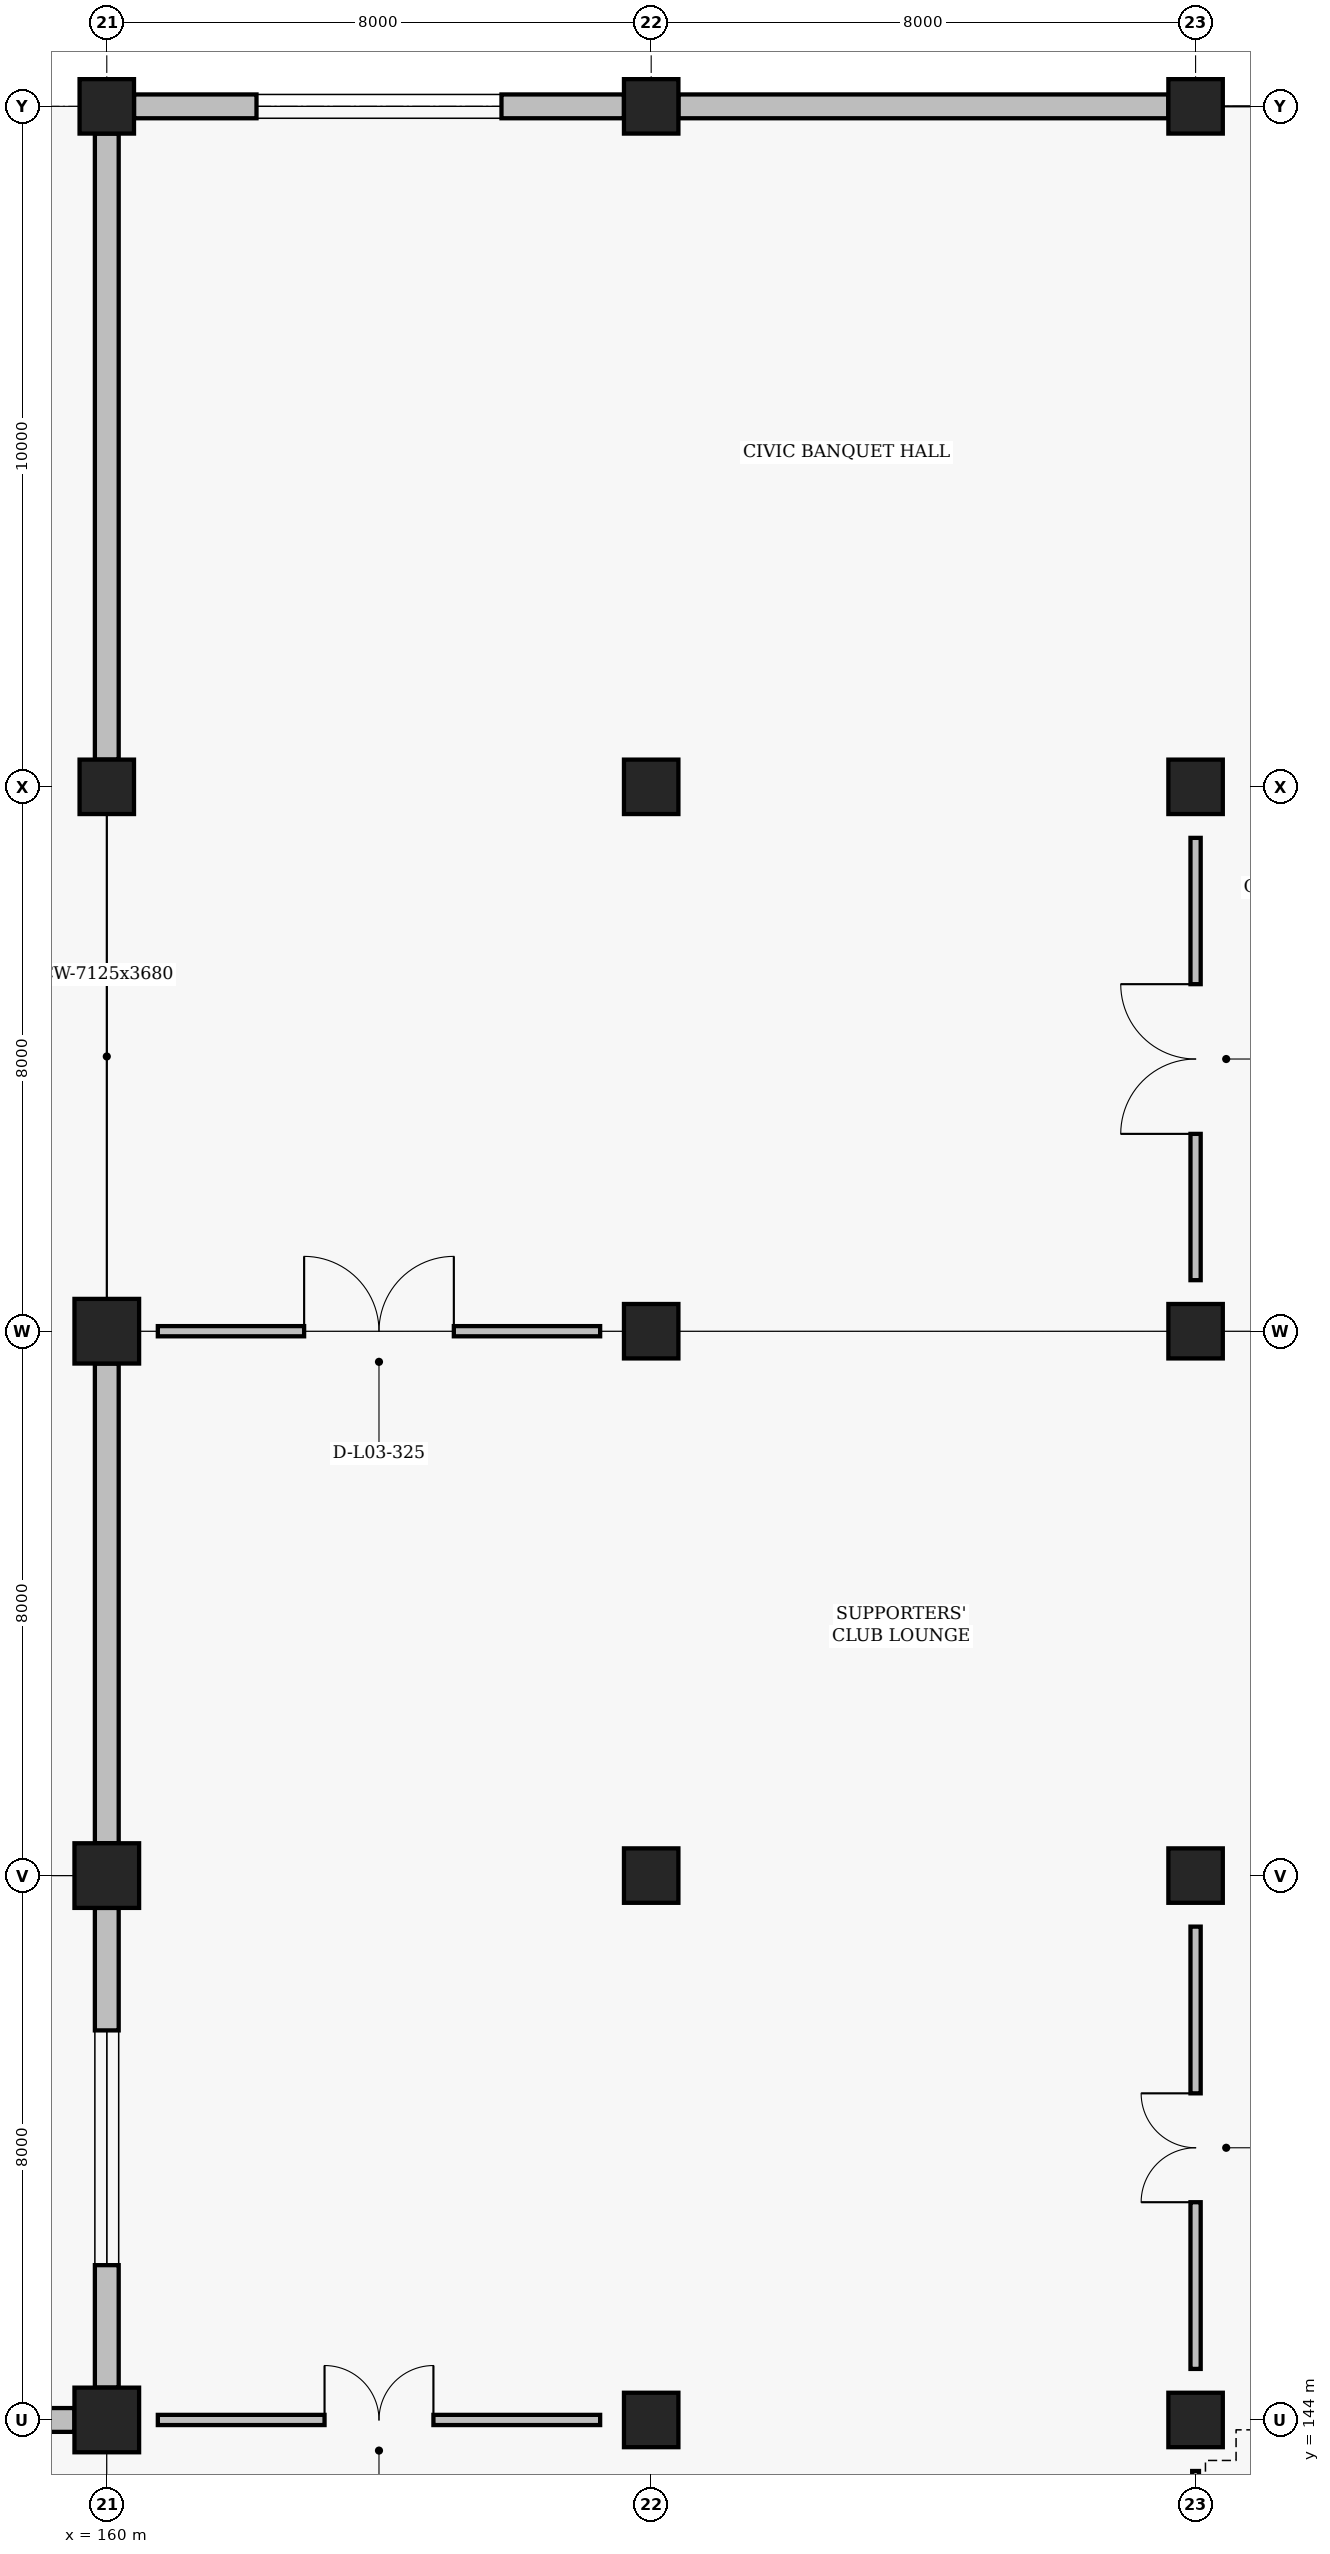
"""IFC4 building model, lengths in metres.
Left out: names, types, materials, properties, quantities, classifications, styles, units other than length and angle.
Written with IfcOpenShell. Run it as: python <this file> out.ifc"""

import sys

from ifc_helpers import new_model, si_unit, direction, frame, frame_2d, origin, origin_2d, place, context, subcontext, project, spatial, rectangle, extrude, element, fill, save


model = new_model("IFC4")
c1 = context("Model", 3, precision=1e-05, world=origin(), true_north=direction((0.0, 1.0)))
c2 = subcontext(c1, "Body", "Model", "MODEL_VIEW")
j1 = project(units=[si_unit("LENGTHUNIT", "METRE"), si_unit("PLANEANGLEUNIT", "RADIAN")], contexts=[c1])
p1 = place(None, origin())
s1 = spatial("IfcSite", under=j1, at=p1, CompositionType="ELEMENT")
p2 = place(p1, origin())
s2 = spatial("IfcBuilding", under=s1, at=p2, CompositionType="ELEMENT")
p3 = place(p2, frame((0.0, 0.0, 9.6)))
s3 = spatial("IfcBuildingStorey", under=s2, at=p3, CompositionType="ELEMENT", Elevation=9.6)
for number, where, z_axis, x_axis in (
    (1, (160.0, 144.0, 0.0), (0.0, 0.0, 1.0), (1.0, 0.0, 0.0)),
    (2, (160.0, 152.0, 0.0), (0.0, 0.0, 1.0), (1.0, 0.0, 0.0)),
    (3, (160.0, 160.0, 0.0), (0.0, 0.0, 1.0), (1.0, 0.0, 0.0)),
):
    element("IfcColumn", number, at=place(p3, frame(where, z_axis=z_axis, x_axis=x_axis)), inside=s3, PredefinedType="COLUMN", context=c2, shape_type="SweptSolid", body=[
        extrude(rectangle(XDim=0.95, YDim=0.95, at=origin_2d()), origin(), (0.0, 0.0, 1.0), 4.8),
    ])
for number, where, z_axis, x_axis in (
    (4, (160.0, 168.0, 0.0), (0.0, 0.0, 1.0), (1.0, 0.0, 0.0)),
    (5, (160.0, 178.0, 0.0), (0.0, 0.0, 1.0), (1.0, 0.0, 0.0)),
    (6, (168.0, 144.0, 0.0), (0.0, 0.0, 1.0), (1.0, 0.0, 0.0)),
    (7, (168.0, 152.0, 0.0), (0.0, 0.0, 1.0), (1.0, 0.0, 0.0)),
    (8, (168.0, 160.0, 0.0), (0.0, 0.0, 1.0), (1.0, 0.0, 0.0)),
    (9, (168.0, 168.0, 0.0), (0.0, 0.0, 1.0), (1.0, 0.0, 0.0)),
    (10, (168.0, 178.0, 0.0), (0.0, 0.0, 1.0), (1.0, 0.0, 0.0)),
    (11, (176.0, 144.0, 0.0), (0.0, 0.0, 1.0), (1.0, 0.0, 0.0)),
    (12, (176.0, 152.0, 0.0), (0.0, 0.0, 1.0), (1.0, 0.0, 0.0)),
    (13, (176.0, 160.0, 0.0), (0.0, 0.0, 1.0), (1.0, 0.0, 0.0)),
    (14, (176.0, 168.0, 0.0), (0.0, 0.0, 1.0), (1.0, 0.0, 0.0)),
    (15, (176.0, 178.0, 0.0), (0.0, 0.0, 1.0), (1.0, 0.0, 0.0)),
):
    element("IfcColumn", number, at=place(p3, frame(where, z_axis=z_axis, x_axis=x_axis)), inside=s3, PredefinedType="COLUMN", context=c2, shape_type="SweptSolid", body=[
        extrude(rectangle(XDim=0.8, YDim=0.8, at=origin_2d()), origin(), (0.0, 0.0, 1.0), 4.8),
    ])
p4 = place(p3, frame((152.475, 144.0, 0.0), z_axis=(0.0, 0.0, 1.0), x_axis=(1.0, 0.0, 0.0)))
e16 = element("IfcWall", 16, at=p4, inside=s3, PredefinedType="SOLIDWALL", context=c2, shape_type="SweptSolid", body=[
    extrude(rectangle(XDim=7.05, YDim=0.35, at=frame_2d((3.525, 0.0))), origin(), (0.0, 0.0, 1.0), 3.93),
])
p5 = place(p3, frame((160.0, 144.475, 0.0), z_axis=(0.0, 0.0, 1.0), x_axis=(0.0, 1.0, 0.0)))
e17 = element("IfcWall", 17, at=p5, inside=s3, PredefinedType="SOLIDWALL", context=c2, shape_type="SweptSolid", body=[
    extrude(rectangle(XDim=7.05, YDim=0.35, at=frame_2d((3.525, 0.0))), origin(), (0.0, 0.0, 1.0), 3.93),
])
p6 = place(p5, frame((1.8, 0.0, 0.95)))
e18 = element("IfcOpeningElement", 18, at=p6, cuts=e17, PredefinedType="OPENING", context=c2, shape_type="SweptSolid", body=[
    extrude(rectangle(XDim=3.45, YDim=2.2, at=frame_2d((1.725, 1.1))), frame((0.0, 0.185, 0.0), z_axis=(0.0, -1.0, 0.0), x_axis=(1.0, 0.0, 0.0)), (0.0, 0.0, 1.0), 0.37),
])
p7 = place(p3, frame((160.0, 152.475, 0.0), z_axis=(0.0, 0.0, 1.0), x_axis=(0.0, 1.0, 0.0)))
e19 = element("IfcWall", 19, at=p7, inside=s3, PredefinedType="SOLIDWALL", context=c2, shape_type="SweptSolid", body=[
    extrude(rectangle(XDim=7.05, YDim=0.35, at=frame_2d((3.525, 0.0))), origin(), (0.0, 0.0, 1.0), 3.68),
])
p8 = place(p3, frame((160.4, 178.0, 0.0), z_axis=(0.0, 0.0, 1.0), x_axis=(1.0, 0.0, 0.0)))
e20 = element("IfcWall", 20, at=p8, inside=s3, PredefinedType="SOLIDWALL", context=c2, shape_type="SweptSolid", body=[
    extrude(rectangle(XDim=7.2, YDim=0.35, at=frame_2d((3.6, 0.0))), origin(), (0.0, 0.0, 1.0), 3.73),
])
p9 = place(p8, frame((1.8, 0.0, 0.95)))
e21 = element("IfcOpeningElement", 21, at=p9, cuts=e20, PredefinedType="OPENING", context=c2, shape_type="SweptSolid", body=[
    extrude(rectangle(XDim=3.6, YDim=2.2, at=frame_2d((1.8, 1.1))), frame((0.0, 0.185, 0.0), z_axis=(0.0, -1.0, 0.0), x_axis=(1.0, 0.0, 0.0)), (0.0, 0.0, 1.0), 0.37),
])
p10 = place(p3, frame((160.0, 168.4, 0.0), z_axis=(0.0, 0.0, 1.0), x_axis=(0.0, 1.0, 0.0)))
e22 = element("IfcWall", 22, at=p10, inside=s3, PredefinedType="SOLIDWALL", context=c2, shape_type="SweptSolid", body=[
    extrude(rectangle(XDim=9.2, YDim=0.35, at=frame_2d((4.6, 0.0))), origin(), (0.0, 0.0, 1.0), 3.93),
])
p11 = place(p3, frame((168.4, 178.0, 0.0), z_axis=(0.0, 0.0, 1.0), x_axis=(1.0, 0.0, 0.0)))
e23 = element("IfcWall", 23, at=p11, inside=s3, PredefinedType="SOLIDWALL", context=c2, shape_type="SweptSolid", body=[
    extrude(rectangle(XDim=7.2, YDim=0.35, at=frame_2d((3.6, 0.0))), origin(), (0.0, 0.0, 1.0), 3.73),
])
p12 = place(p3, frame((160.75, 144.0, 0.0), z_axis=(0.0, 0.0, 1.0), x_axis=(1.0, 0.0, 0.0)))
e24 = element("IfcWall", 24, at=p12, inside=s3, PredefinedType="PARTITIONING", context=c2, shape_type="SweptSolid", body=[
    extrude(rectangle(XDim=6.5, YDim=0.15, at=frame_2d((3.25, 0.0))), origin(), (0.0, 0.0, 1.0), 3.93),
])
p13 = place(p12, frame((2.45, 0.0, 0.0)))
e25 = element("IfcOpeningElement", 25, at=p13, cuts=e24, PredefinedType="OPENING", context=c2, shape_type="SweptSolid", body=[
    extrude(rectangle(XDim=1.6, YDim=2.2, at=frame_2d((0.8, 1.1))), frame((0.0, 0.085, 0.0), z_axis=(0.0, -1.0, 0.0), x_axis=(1.0, 0.0, 0.0)), (0.0, 0.0, 1.0), 0.17),
])
p14 = place(p3, frame((160.75, 160.0, 0.0), z_axis=(0.0, 0.0, 1.0), x_axis=(1.0, 0.0, 0.0)))
e26 = element("IfcWall", 26, at=p14, inside=s3, PredefinedType="PARTITIONING", context=c2, shape_type="SweptSolid", body=[
    extrude(rectangle(XDim=6.5, YDim=0.15, at=frame_2d((3.25, 0.0))), origin(), (0.0, 0.0, 1.0), 3.68),
])
p15 = place(p14, frame((2.15, 0.0, 0.0)))
e27 = element("IfcOpeningElement", 27, at=p15, cuts=e26, PredefinedType="OPENING", context=c2, shape_type="SweptSolid", body=[
    extrude(rectangle(XDim=2.2, YDim=2.4, at=frame_2d((1.1, 1.2))), frame((0.0, 0.085, 0.0), z_axis=(0.0, -1.0, 0.0), x_axis=(1.0, 0.0, 0.0)), (0.0, 0.0, 1.0), 0.17),
])
p16 = place(p3, frame((176.0, 136.75, 0.0), z_axis=(0.0, 0.0, 1.0), x_axis=(0.0, 1.0, 0.0)))
e28 = element("IfcWall", 28, at=p16, inside=s3, PredefinedType="PARTITIONING", context=c2, shape_type="SweptSolid", body=[
    extrude(rectangle(XDim=6.5, YDim=0.1, at=frame_2d((3.25, 0.0))), origin(), (0.0, 0.0, 1.0), 3.79),
])
p17 = place(p16, frame((2.775, 0.0, 0.0)))
e29 = element("IfcOpeningElement", 29, at=p17, cuts=e28, PredefinedType="OPENING", context=c2, shape_type="SweptSolid", body=[
    extrude(rectangle(XDim=0.95, YDim=2.1, at=frame_2d((0.475, 1.05))), frame((0.0, 0.06, 0.0), z_axis=(0.0, -1.0, 0.0), x_axis=(1.0, 0.0, 0.0)), (0.0, 0.0, 1.0), 0.12),
])
p18 = place(p3, frame((176.0, 144.75, 0.0), z_axis=(0.0, 0.0, 1.0), x_axis=(0.0, 1.0, 0.0)))
e30 = element("IfcWall", 30, at=p18, inside=s3, PredefinedType="PARTITIONING", context=c2, shape_type="SweptSolid", body=[
    extrude(rectangle(XDim=6.5, YDim=0.15, at=frame_2d((3.25, 0.0))), origin(), (0.0, 0.0, 1.0), 3.93),
])
p19 = place(p18, frame((2.45, 0.0, 0.0)))
e31 = element("IfcOpeningElement", 31, at=p19, cuts=e30, PredefinedType="OPENING", context=c2, shape_type="SweptSolid", body=[
    extrude(rectangle(XDim=1.6, YDim=2.2, at=frame_2d((0.8, 1.1))), frame((0.0, 0.085, 0.0), z_axis=(0.0, -1.0, 0.0), x_axis=(1.0, 0.0, 0.0)), (0.0, 0.0, 1.0), 0.17),
])
p20 = place(p3, frame((176.0, 160.75, 0.0), z_axis=(0.0, 0.0, 1.0), x_axis=(0.0, 1.0, 0.0)))
e32 = element("IfcWall", 32, at=p20, inside=s3, PredefinedType="PARTITIONING", context=c2, shape_type="SweptSolid", body=[
    extrude(rectangle(XDim=6.5, YDim=0.15, at=frame_2d((3.25, 0.0))), origin(), (0.0, 0.0, 1.0), 3.93),
])
p21 = place(p20, frame((2.15, 0.0, 0.0)))
e33 = element("IfcOpeningElement", 33, at=p21, cuts=e32, PredefinedType="OPENING", context=c2, shape_type="SweptSolid", body=[
    extrude(rectangle(XDim=2.2, YDim=2.4, at=frame_2d((1.1, 1.2))), frame((0.0, 0.085, 0.0), z_axis=(0.0, -1.0, 0.0), x_axis=(1.0, 0.0, 0.0)), (0.0, 0.0, 1.0), 0.17),
])
p22 = place(p6, origin())
e34 = element("IfcWindow", 34, at=p22, inside=s3, PartitioningType="SINGLE_PANEL", PredefinedType="WINDOW", context=c2, shape_type="SweptSolid", body=[
    extrude(rectangle(XDim=3.45, YDim=2.2, at=frame_2d((1.725, 1.1))), frame((0.0, 0.03, 0.0), z_axis=(0.0, -1.0, 0.0), x_axis=(1.0, 0.0, 0.0)), (0.0, 0.0, 1.0), 0.06),
])
fill(e18, e34)
p23 = place(p9, origin())
e35 = element("IfcWindow", 35, at=p23, inside=s3, PartitioningType="SINGLE_PANEL", PredefinedType="WINDOW", context=c2, shape_type="SweptSolid", body=[
    extrude(rectangle(XDim=3.6, YDim=2.2, at=frame_2d((1.8, 1.1))), frame((0.0, 0.03, 0.0), z_axis=(0.0, -1.0, 0.0), x_axis=(1.0, 0.0, 0.0)), (0.0, 0.0, 1.0), 0.06),
])
fill(e21, e35)
p24 = place(p13, origin())
e36 = element("IfcDoor", 36, at=p24, inside=s3, OperationType="DOUBLE_SWING_LEFT", PredefinedType="DOOR", context=c2, shape_type="SweptSolid", body=[
    extrude(rectangle(XDim=1.6, YDim=2.2, at=frame_2d((0.8, 1.1))), frame((0.0, 0.025, 0.0), z_axis=(0.0, -1.0, 0.0), x_axis=(1.0, 0.0, 0.0)), (0.0, 0.0, 1.0), 0.05),
])
fill(e25, e36)
p25 = place(p15, origin())
e37 = element("IfcDoor", 37, at=p25, inside=s3, OperationType="DOUBLE_SWING_LEFT", PredefinedType="DOOR", context=c2, shape_type="SweptSolid", body=[
    extrude(rectangle(XDim=2.2, YDim=2.4, at=frame_2d((1.1, 1.2))), frame((0.0, 0.025, 0.0), z_axis=(0.0, -1.0, 0.0), x_axis=(1.0, 0.0, 0.0)), (0.0, 0.0, 1.0), 0.05),
])
fill(e27, e37)
p26 = place(p19, origin())
e38 = element("IfcDoor", 38, at=p26, inside=s3, OperationType="DOUBLE_SWING_LEFT", PredefinedType="DOOR", context=c2, shape_type="SweptSolid", body=[
    extrude(rectangle(XDim=1.6, YDim=2.2, at=frame_2d((0.8, 1.1))), frame((0.0, 0.025, 0.0), z_axis=(0.0, -1.0, 0.0), x_axis=(1.0, 0.0, 0.0)), (0.0, 0.0, 1.0), 0.05),
])
fill(e31, e38)
p27 = place(p21, origin())
e39 = element("IfcDoor", 39, at=p27, inside=s3, OperationType="DOUBLE_SWING_LEFT", PredefinedType="DOOR", context=c2, shape_type="SweptSolid", body=[
    extrude(rectangle(XDim=2.2, YDim=2.4, at=frame_2d((1.1, 1.2))), frame((0.0, 0.025, 0.0), z_axis=(0.0, -1.0, 0.0), x_axis=(1.0, 0.0, 0.0)), (0.0, 0.0, 1.0), 0.05),
])
fill(e33, e39)
save(model, sys.argv[1])
